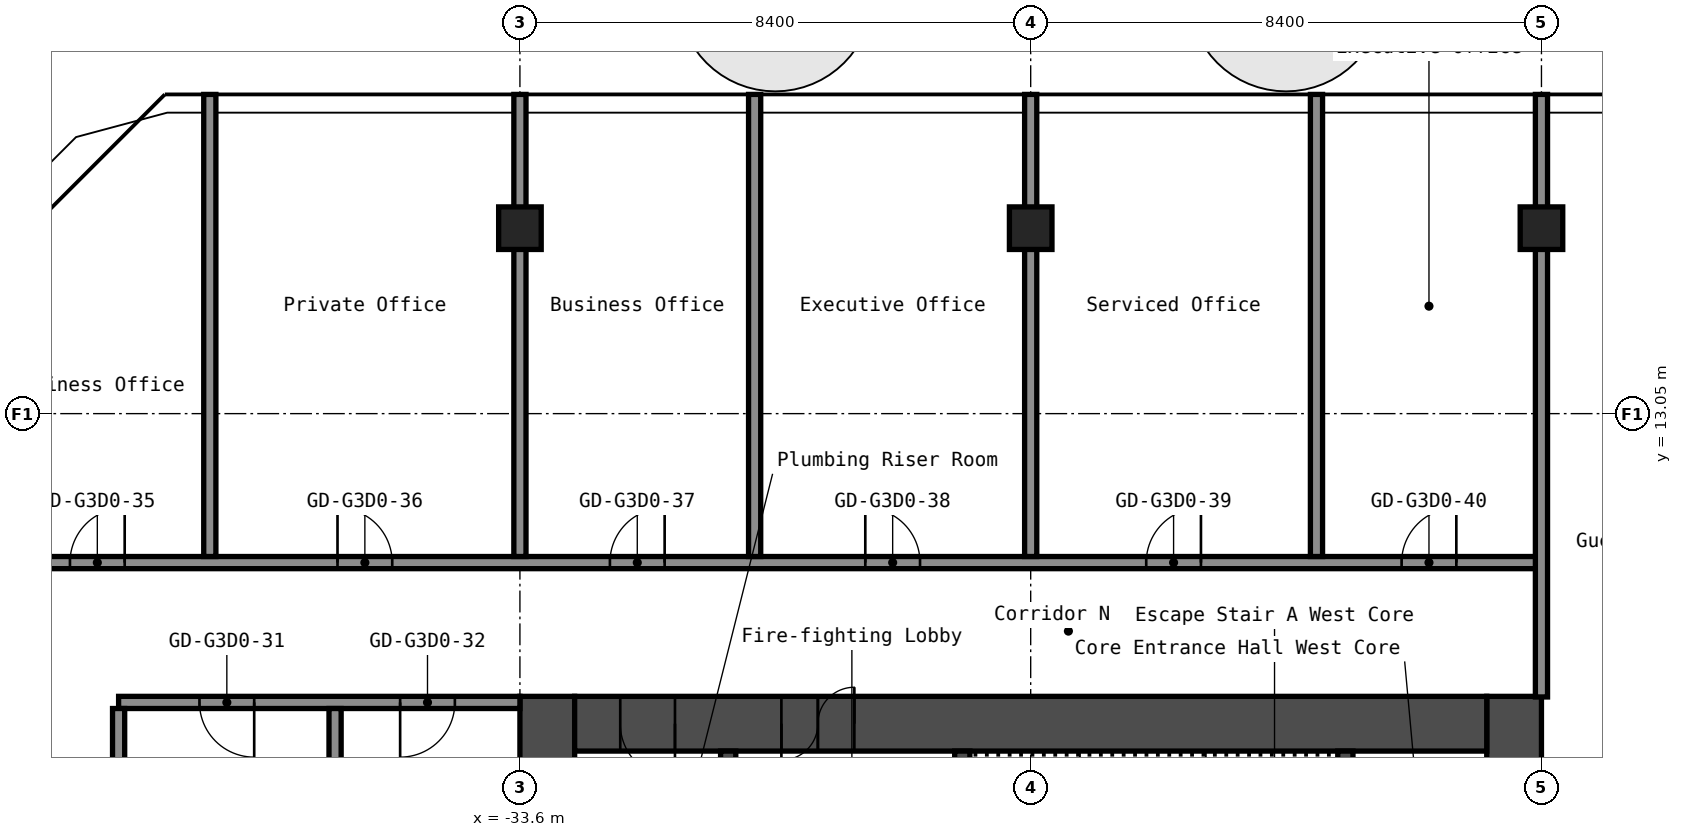
"""IFC4 building model, lengths in metres.
Left out: names, types, materials, properties, quantities, classifications, styles, units other than length and angle.
Written with IfcOpenShell. Run it as: python <this file> out.ifc"""

import sys

from ifc_helpers import new_model, si_unit, direction, frame, frame_2d, origin, origin_2d, place, context, subcontext, project, spatial, rectangle, hollow_rectangle, extrude, element, fill, save


model = new_model("IFC4")
c1 = context("Model", 3, precision=1e-05, world=origin(), true_north=direction((0.0, 1.0)))
c2 = subcontext(c1, "Body", "Model", "MODEL_VIEW")
j1 = project(units=[si_unit("LENGTHUNIT", "METRE"), si_unit("PLANEANGLEUNIT", "RADIAN")], contexts=[c1])
p1 = place(None, origin())
s1 = spatial("IfcSite", under=j1, at=p1, CompositionType="ELEMENT")
p2 = place(p1, origin())
s2 = spatial("IfcBuilding", under=s1, at=p2, CompositionType="ELEMENT")
p3 = place(p2, frame((0.0, 0.0, 140.6)))
s3 = spatial("IfcBuildingStorey", under=s2, at=p3, CompositionType="ELEMENT", Elevation=140.6)
for number, where, z_axis, x_axis in (
    (1, (-33.6, 16.1, 0.0), (0.0, 0.0, 1.0), (1.0, 0.0, 0.0)),
    (2, (-25.2, 16.1, 0.0), (0.0, 0.0, 1.0), (1.0, 0.0, 0.0)),
    (3, (-16.8, 16.1, 0.0), (0.0, 0.0, 1.0), (1.0, 0.0, 0.0)),
):
    element("IfcColumn", number, at=place(p3, frame(where, z_axis=z_axis, x_axis=x_axis)), inside=s3, PredefinedType="COLUMN", context=c2, shape_type="SweptSolid", body=[
        extrude(hollow_rectangle(XDim=0.7, YDim=0.7, WallThickness=0.028, at=origin_2d()), origin(), (0.0, 0.0, 1.0), 2.75),
    ])
p4 = place(p3, frame((-17.25, -8.4, 0.0), z_axis=(0.0, 0.0, 1.0), x_axis=(0.0, 1.0, 0.0)))
e4 = element("IfcWall", 4, at=p4, inside=s3, PredefinedType="SHEAR", context=c2, shape_type="SweptSolid", body=[
    extrude(rectangle(XDim=16.8, YDim=0.9, at=frame_2d((8.4, 0.0))), origin(), (0.0, 0.0, 1.0), 2.75),
])
p5 = place(p4, frame((7.1, 0.0, 0.0)))
e5 = element("IfcOpeningElement", 5, at=p5, cuts=e4, PredefinedType="OPENING", context=c2, shape_type="SweptSolid", body=[
    extrude(rectangle(XDim=1.6, YDim=2.1, at=frame_2d((0.8, 1.05))), frame((0.0, 0.46, 0.0), z_axis=(0.0, -1.0, 0.0), x_axis=(1.0, 0.0, 0.0)), (0.0, 0.0, 1.0), 0.92),
])
p6 = place(p3, frame((-33.15, -8.4, 0.0), z_axis=(0.0, 0.0, 1.0), x_axis=(0.0, 1.0, 0.0)))
e6 = element("IfcWall", 6, at=p6, inside=s3, PredefinedType="SHEAR", context=c2, shape_type="SweptSolid", body=[
    extrude(rectangle(XDim=16.8, YDim=0.9, at=frame_2d((8.4, 0.0))), origin(), (0.0, 0.0, 1.0), 2.75),
])
p7 = place(p3, frame((-32.7, 7.95, 0.0), z_axis=(0.0, 0.0, 1.0), x_axis=(1.0, 0.0, 0.0)))
e7 = element("IfcWall", 7, at=p7, inside=s3, PredefinedType="SHEAR", context=c2, shape_type="SweptSolid", body=[
    extrude(rectangle(XDim=15.0, YDim=0.9, at=frame_2d((7.5, 0.0))), origin(), (0.0, 0.0, 1.0), 2.75),
])
p8 = place(p7, frame((3.4, 0.0, 0.0)))
e8 = element("IfcOpeningElement", 8, at=p8, cuts=e7, PredefinedType="OPENING", context=c2, shape_type="SweptSolid", body=[
    extrude(rectangle(XDim=1.2, YDim=2.1, at=frame_2d((0.6, 1.05))), frame((0.0, 0.46, 0.0), z_axis=(0.0, -1.0, 0.0), x_axis=(1.0, 0.0, 0.0)), (0.0, 0.0, 1.0), 0.92),
])
p9 = place(p7, frame((0.75, 0.0, 0.0)))
e9 = element("IfcOpeningElement", 9, at=p9, cuts=e7, PredefinedType="OPENING", context=c2, shape_type="SweptSolid", body=[
    extrude(rectangle(XDim=0.9, YDim=2.1, at=frame_2d((0.45, 1.05))), frame((0.0, 0.46, 0.0), z_axis=(0.0, -1.0, 0.0), x_axis=(1.0, 0.0, 0.0)), (0.0, 0.0, 1.0), 0.92),
])
p10 = place(p3, frame((-20.025, 1.2, 0.0), z_axis=(0.0, 0.0, 1.0), x_axis=(0.0, 1.0, 0.0)))
e10 = element("IfcWall", 10, at=p10, inside=s3, PredefinedType="SHEAR", context=c2, shape_type="SweptSolid", body=[
    extrude(rectangle(XDim=6.3, YDim=0.25, at=frame_2d((3.15, 0.0))), origin(), (0.0, 0.0, 1.0), 2.75),
])
p11 = place(p3, frame((-26.325, 3.75, 0.0), z_axis=(0.0, 0.0, 1.0), x_axis=(0.0, 1.0, 0.0)))
e11 = element("IfcWall", 11, at=p11, inside=s3, PredefinedType="SHEAR", context=c2, shape_type="SweptSolid", body=[
    extrude(rectangle(XDim=3.75, YDim=0.25, at=frame_2d((1.875, 0.0))), origin(), (0.0, 0.0, 1.0), 2.75),
])
p12 = place(p11, frame((1.25, 0.0, 0.0)))
e12 = element("IfcOpeningElement", 12, at=p12, cuts=e11, PredefinedType="OPENING", context=c2, shape_type="SweptSolid", body=[
    extrude(rectangle(XDim=1.2, YDim=2.1, at=frame_2d((0.6, 1.05))), frame((0.0, 0.135, 0.0), z_axis=(0.0, -1.0, 0.0), x_axis=(1.0, 0.0, 0.0)), (0.0, 0.0, 1.0), 0.27),
])
p13 = place(p3, frame((-30.175, 1.45, 0.0), z_axis=(0.0, 0.0, 1.0), x_axis=(0.0, 1.0, 0.0)))
e13 = element("IfcWall", 13, at=p13, inside=s3, PredefinedType="SHEAR", context=c2, shape_type="SweptSolid", body=[
    extrude(rectangle(XDim=6.05, YDim=0.25, at=frame_2d((3.025, 0.0))), origin(), (0.0, 0.0, 1.0), 2.75),
])
p14 = place(p13, frame((2.625, 0.0, 0.0)))
e14 = element("IfcOpeningElement", 14, at=p14, cuts=e13, PredefinedType="OPENING", context=c2, shape_type="SweptSolid", body=[
    extrude(rectangle(XDim=1.1, YDim=2.1, at=frame_2d((0.55, 1.05))), frame((0.0, 0.135, 0.0), z_axis=(0.0, -1.0, 0.0), x_axis=(1.0, 0.0, 0.0)), (0.0, 0.0, 1.0), 0.27),
])
p15 = place(p3, frame((-40.2, 8.3, 0.0), z_axis=(0.0, 0.0, 1.0), x_axis=(1.0, 0.0, 0.0)))
e15 = element("IfcWall", 15, at=p15, inside=s3, PredefinedType="PARTITIONING", context=c2, shape_type="SweptSolid", body=[
    extrude(rectangle(XDim=6.6, YDim=0.2, at=frame_2d((3.3, 0.0))), origin(), (0.0, 0.0, 1.0), 2.75),
])
p16 = place(p15, frame((1.33, 0.0, 0.0)))
e16 = element("IfcOpeningElement", 16, at=p16, cuts=e15, PredefinedType="OPENING", context=c2, shape_type="SweptSolid", body=[
    extrude(rectangle(XDim=0.9, YDim=2.1, at=frame_2d((0.45, 1.05))), frame((0.0, 0.11, 0.0), z_axis=(0.0, -1.0, 0.0), x_axis=(1.0, 0.0, 0.0)), (0.0, 0.0, 1.0), 0.22),
])
p17 = place(p15, frame((4.63, 0.0, 0.0)))
e17 = element("IfcOpeningElement", 17, at=p17, cuts=e15, PredefinedType="OPENING", context=c2, shape_type="SweptSolid", body=[
    extrude(rectangle(XDim=0.9, YDim=2.1, at=frame_2d((0.45, 1.05))), frame((0.0, 0.11, 0.0), z_axis=(0.0, -1.0, 0.0), x_axis=(1.0, 0.0, 0.0)), (0.0, 0.0, 1.0), 0.22),
])
p18 = place(p3, frame((-42.7, 10.6, 0.0), z_axis=(0.0, 0.0, 1.0), x_axis=(1.0, 0.0, 0.0)))
e18 = element("IfcWall", 18, at=p18, inside=s3, PredefinedType="PARTITIONING", context=c2, shape_type="SweptSolid", body=[
    extrude(rectangle(XDim=25.9, YDim=0.2, at=frame_2d((12.95, 0.0))), origin(), (0.0, 0.0, 1.0), 2.75),
])
p19 = place(p18, frame((1.7, 0.0, 0.0)))
e19 = element("IfcOpeningElement", 19, at=p19, cuts=e18, PredefinedType="OPENING", context=c2, shape_type="SweptSolid", body=[
    extrude(rectangle(XDim=0.9, YDim=2.1, at=frame_2d((0.45, 1.05))), frame((0.0, 0.11, 0.0), z_axis=(0.0, -1.0, 0.0), x_axis=(1.0, 0.0, 0.0)), (0.0, 0.0, 1.0), 0.22),
])
p20 = place(p18, frame((6.1, 0.0, 0.0)))
e20 = element("IfcOpeningElement", 20, at=p20, cuts=e18, PredefinedType="OPENING", context=c2, shape_type="SweptSolid", body=[
    extrude(rectangle(XDim=0.9, YDim=2.1, at=frame_2d((0.45, 1.05))), frame((0.0, 0.11, 0.0), z_axis=(0.0, -1.0, 0.0), x_axis=(1.0, 0.0, 0.0)), (0.0, 0.0, 1.0), 0.22),
])
p21 = place(p18, frame((10.58, 0.0, 0.0)))
e21 = element("IfcOpeningElement", 21, at=p21, cuts=e18, PredefinedType="OPENING", context=c2, shape_type="SweptSolid", body=[
    extrude(rectangle(XDim=0.9, YDim=2.1, at=frame_2d((0.45, 1.05))), frame((0.0, 0.11, 0.0), z_axis=(0.0, -1.0, 0.0), x_axis=(1.0, 0.0, 0.0)), (0.0, 0.0, 1.0), 0.22),
])
p22 = place(p18, frame((14.78, 0.0, 0.0)))
e22 = element("IfcOpeningElement", 22, at=p22, cuts=e18, PredefinedType="OPENING", context=c2, shape_type="SweptSolid", body=[
    extrude(rectangle(XDim=0.9, YDim=2.1, at=frame_2d((0.45, 1.05))), frame((0.0, 0.11, 0.0), z_axis=(0.0, -1.0, 0.0), x_axis=(1.0, 0.0, 0.0)), (0.0, 0.0, 1.0), 0.22),
])
p23 = place(p18, frame((19.4, 0.0, 0.0)))
e23 = element("IfcOpeningElement", 23, at=p23, cuts=e18, PredefinedType="OPENING", context=c2, shape_type="SweptSolid", body=[
    extrude(rectangle(XDim=0.9, YDim=2.1, at=frame_2d((0.45, 1.05))), frame((0.0, 0.11, 0.0), z_axis=(0.0, -1.0, 0.0), x_axis=(1.0, 0.0, 0.0)), (0.0, 0.0, 1.0), 0.22),
])
p24 = place(p18, frame((23.6, 0.0, 0.0)))
e24 = element("IfcOpeningElement", 24, at=p24, cuts=e18, PredefinedType="OPENING", context=c2, shape_type="SweptSolid", body=[
    extrude(rectangle(XDim=0.9, YDim=2.1, at=frame_2d((0.45, 1.05))), frame((0.0, 0.11, 0.0), z_axis=(0.0, -1.0, 0.0), x_axis=(1.0, 0.0, 0.0)), (0.0, 0.0, 1.0), 0.22),
])
p25 = place(p3, frame((-40.2, -8.2, 0.0), z_axis=(0.0, 0.0, 1.0), x_axis=(0.0, 1.0, 0.0)))
e25 = element("IfcWall", 25, at=p25, inside=s3, PredefinedType="PARTITIONING", context=c2, shape_type="SweptSolid", body=[
    extrude(rectangle(XDim=16.4, YDim=0.2, at=frame_2d((8.2, 0.0))), origin(), (0.0, 0.0, 1.0), 2.75),
])
p26 = place(p3, frame((-38.7, 10.7, 0.0), z_axis=(0.0, 0.0, 1.0), x_axis=(0.0, 1.0, 0.0)))
e26 = element("IfcWall", 26, at=p26, inside=s3, PredefinedType="PARTITIONING", context=c2, shape_type="SweptSolid", body=[
    extrude(rectangle(XDim=7.6, YDim=0.2, at=frame_2d((3.8, 0.0))), origin(), (0.0, 0.0, 1.0), 2.75),
])
p27 = place(p3, frame((-36.64, 0.0, 0.0), z_axis=(0.0, 0.0, 1.0), x_axis=(0.0, 1.0, 0.0)))
e27 = element("IfcWall", 27, at=p27, inside=s3, PredefinedType="PARTITIONING", context=c2, shape_type="SweptSolid", body=[
    extrude(rectangle(XDim=8.2, YDim=0.2, at=frame_2d((4.1, 0.0))), origin(), (0.0, 0.0, 1.0), 2.75),
])
for number, where, z_axis, x_axis in (
    (28, (-33.6, 10.7, 0.0), (0.0, 0.0, 1.0), (0.0, 1.0, 0.0)),
    (29, (-29.74, 10.7, 0.0), (0.0, 0.0, 1.0), (0.0, 1.0, 0.0)),
    (30, (-25.2, 10.7, 0.0), (0.0, 0.0, 1.0), (0.0, 1.0, 0.0)),
    (31, (-20.5, 10.7, 0.0), (0.0, 0.0, 1.0), (0.0, 1.0, 0.0)),
):
    element("IfcWall", number, at=place(p3, frame(where, z_axis=z_axis, x_axis=x_axis)), inside=s3, PredefinedType="PARTITIONING", context=c2, shape_type="SweptSolid", body=[
        extrude(rectangle(XDim=7.6, YDim=0.2, at=frame_2d((3.8, 0.0))), origin(), (0.0, 0.0, 1.0), 2.75),
    ])
p28 = place(p3, frame((-16.8, 8.39, 0.0), z_axis=(0.0, 0.0, 1.0), x_axis=(0.0, 1.0, 0.0)))
e32 = element("IfcWall", 32, at=p28, inside=s3, PredefinedType="PARTITIONING", context=c2, shape_type="SweptSolid", body=[
    extrude(rectangle(XDim=9.91, YDim=0.2, at=frame_2d((4.955, 0.0))), origin(), (0.0, 0.0, 1.0), 2.75),
])
p29 = place(p8, origin())
e33 = element("IfcDoor", 33, at=p29, inside=s3, OperationType="DOUBLE_DOOR_SINGLE_SWING", PredefinedType="DOOR", context=c2, shape_type="SweptSolid", body=[
    extrude(rectangle(XDim=1.2, YDim=2.1, at=frame_2d((0.6, 1.05))), frame((0.0, 0.025, 0.0), z_axis=(0.0, -1.0, 0.0), x_axis=(1.0, 0.0, 0.0)), (0.0, 0.0, 1.0), 0.05),
])
fill(e8, e33)
p30 = place(p9, origin())
e34 = element("IfcDoor", 34, at=p30, inside=s3, OperationType="SINGLE_SWING_RIGHT", PredefinedType="DOOR", context=c2, shape_type="SweptSolid", body=[
    extrude(rectangle(XDim=0.9, YDim=2.1, at=frame_2d((0.45, 1.05))), frame((0.0, 0.025, 0.0), z_axis=(0.0, -1.0, 0.0), x_axis=(1.0, 0.0, 0.0)), (0.0, 0.0, 1.0), 0.05),
])
fill(e9, e34)
p31 = place(p16, origin())
e35 = element("IfcDoor", 35, at=p31, inside=s3, OperationType="SINGLE_SWING_RIGHT", PredefinedType="DOOR", context=c2, shape_type="SweptSolid", body=[
    extrude(rectangle(XDim=0.9, YDim=2.1, at=frame_2d((0.45, 1.05))), frame((0.0, 0.025, 0.0), z_axis=(0.0, -1.0, 0.0), x_axis=(1.0, 0.0, 0.0)), (0.0, 0.0, 1.0), 0.05),
])
fill(e16, e35)
p32 = place(p17, origin())
e36 = element("IfcDoor", 36, at=p32, inside=s3, OperationType="SINGLE_SWING_LEFT", PredefinedType="DOOR", context=c2, shape_type="SweptSolid", body=[
    extrude(rectangle(XDim=0.9, YDim=2.1, at=frame_2d((0.45, 1.05))), frame((0.0, 0.025, 0.0), z_axis=(0.0, -1.0, 0.0), x_axis=(1.0, 0.0, 0.0)), (0.0, 0.0, 1.0), 0.05),
])
fill(e17, e36)
p33 = place(p19, origin())
e37 = element("IfcDoor", 37, at=p33, inside=s3, OperationType="SINGLE_SWING_LEFT", PredefinedType="DOOR", context=c2, shape_type="SweptSolid", body=[
    extrude(rectangle(XDim=0.9, YDim=2.1, at=frame_2d((0.45, 1.05))), frame((0.0, 0.025, 0.0), z_axis=(0.0, -1.0, 0.0), x_axis=(1.0, 0.0, 0.0)), (0.0, 0.0, 1.0), 0.05),
])
fill(e19, e37)
p34 = place(p20, origin())
e38 = element("IfcDoor", 38, at=p34, inside=s3, OperationType="SINGLE_SWING_RIGHT", PredefinedType="DOOR", context=c2, shape_type="SweptSolid", body=[
    extrude(rectangle(XDim=0.9, YDim=2.1, at=frame_2d((0.45, 1.05))), frame((0.0, 0.025, 0.0), z_axis=(0.0, -1.0, 0.0), x_axis=(1.0, 0.0, 0.0)), (0.0, 0.0, 1.0), 0.05),
])
fill(e20, e38)
p35 = place(p21, origin())
e39 = element("IfcDoor", 39, at=p35, inside=s3, OperationType="SINGLE_SWING_LEFT", PredefinedType="DOOR", context=c2, shape_type="SweptSolid", body=[
    extrude(rectangle(XDim=0.9, YDim=2.1, at=frame_2d((0.45, 1.05))), frame((0.0, 0.025, 0.0), z_axis=(0.0, -1.0, 0.0), x_axis=(1.0, 0.0, 0.0)), (0.0, 0.0, 1.0), 0.05),
])
fill(e21, e39)
p36 = place(p22, origin())
e40 = element("IfcDoor", 40, at=p36, inside=s3, OperationType="SINGLE_SWING_RIGHT", PredefinedType="DOOR", context=c2, shape_type="SweptSolid", body=[
    extrude(rectangle(XDim=0.9, YDim=2.1, at=frame_2d((0.45, 1.05))), frame((0.0, 0.025, 0.0), z_axis=(0.0, -1.0, 0.0), x_axis=(1.0, 0.0, 0.0)), (0.0, 0.0, 1.0), 0.05),
])
fill(e22, e40)
p37 = place(p23, origin())
e41 = element("IfcDoor", 41, at=p37, inside=s3, OperationType="SINGLE_SWING_LEFT", PredefinedType="DOOR", context=c2, shape_type="SweptSolid", body=[
    extrude(rectangle(XDim=0.9, YDim=2.1, at=frame_2d((0.45, 1.05))), frame((0.0, 0.025, 0.0), z_axis=(0.0, -1.0, 0.0), x_axis=(1.0, 0.0, 0.0)), (0.0, 0.0, 1.0), 0.05),
])
fill(e23, e41)
p38 = place(p24, origin())
e42 = element("IfcDoor", 42, at=p38, inside=s3, OperationType="SINGLE_SWING_LEFT", PredefinedType="DOOR", context=c2, shape_type="SweptSolid", body=[
    extrude(rectangle(XDim=0.9, YDim=2.1, at=frame_2d((0.45, 1.05))), frame((0.0, 0.025, 0.0), z_axis=(0.0, -1.0, 0.0), x_axis=(1.0, 0.0, 0.0)), (0.0, 0.0, 1.0), 0.05),
])
fill(e24, e42)
save(model, sys.argv[1])
